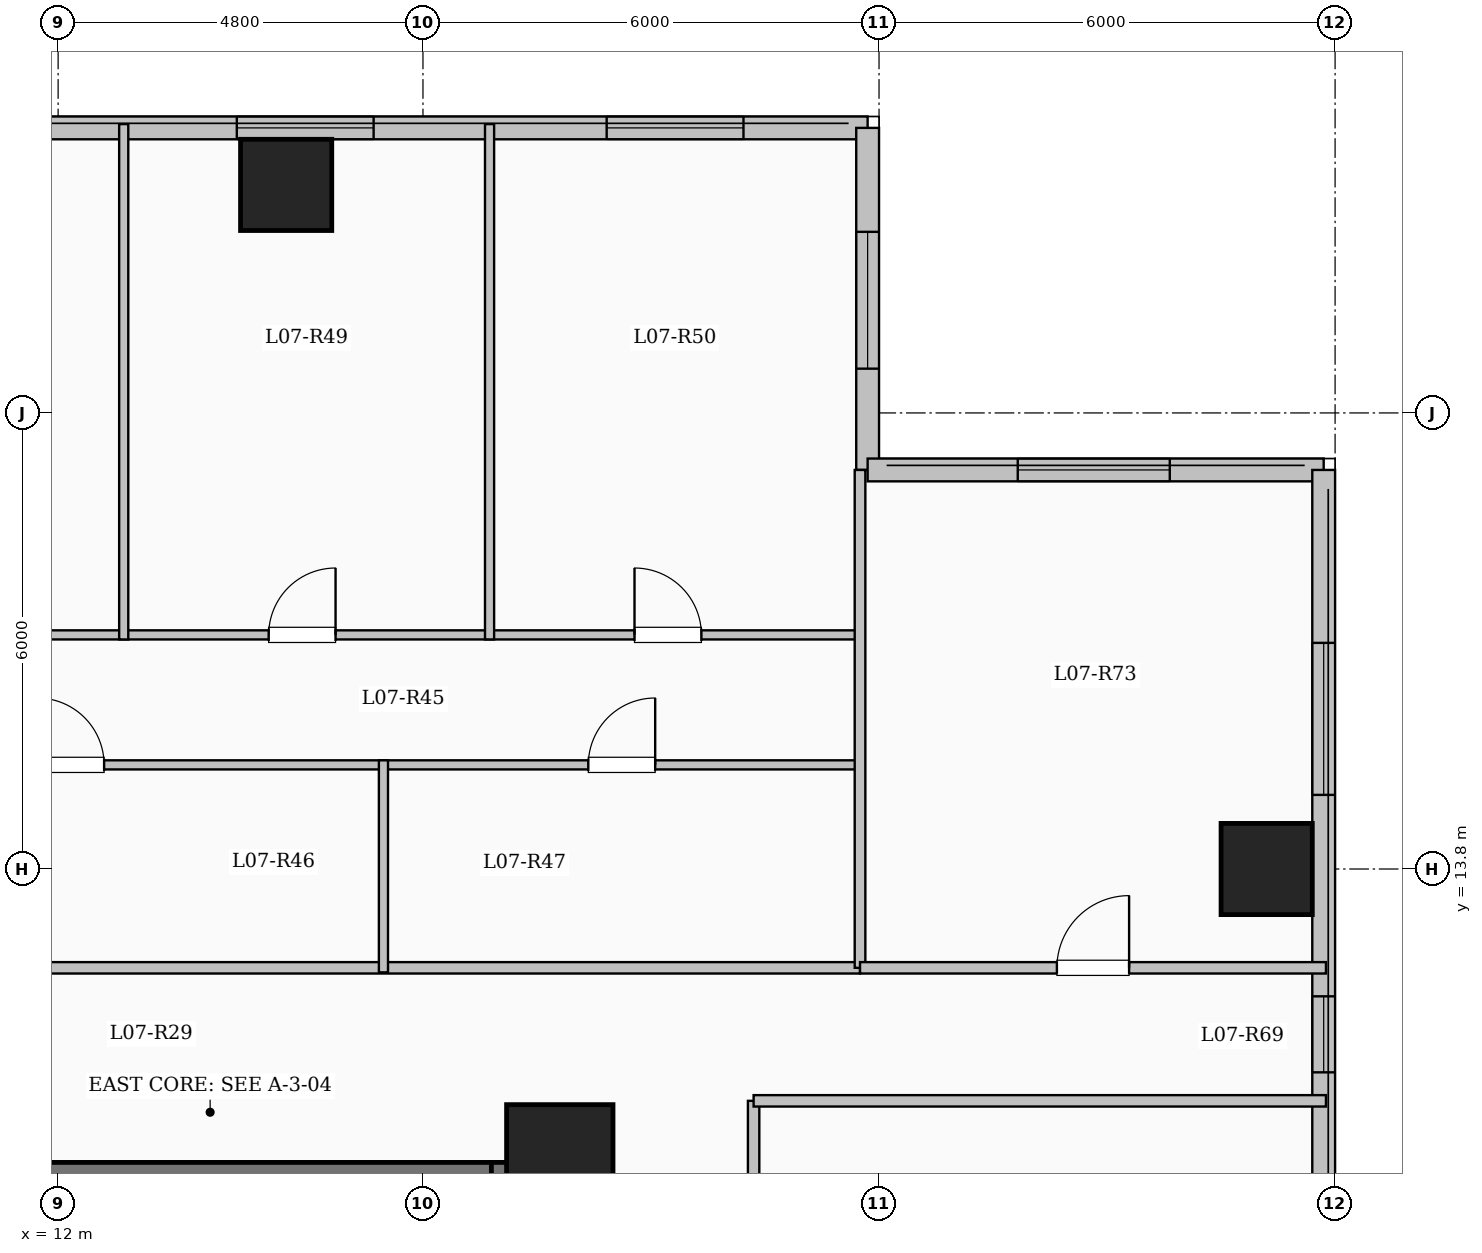
"""IFC4 building model, lengths in metres.
Left out: names, types, materials, properties, quantities, classifications, styles, units other than length and angle.
Written with IfcOpenShell. Run it as: python <this file> out.ifc"""

import sys

from ifc_helpers import new_model, si_unit, direction, frame, frame_2d, origin, origin_2d, place, context, subcontext, project, spatial, rectangle, extrude, element, fill, save


model = new_model("IFC4")
c1 = context("Model", 3, precision=1e-05, world=origin(), true_north=direction((0.0, 1.0)))
c2 = subcontext(c1, "Body", "Model", "MODEL_VIEW")
j1 = project(units=[si_unit("LENGTHUNIT", "METRE"), si_unit("PLANEANGLEUNIT", "RADIAN")], contexts=[c1])
p1 = place(None, origin())
s1 = spatial("IfcSite", under=j1, at=p1, CompositionType="ELEMENT")
p2 = place(p1, origin())
s2 = spatial("IfcBuilding", under=s1, at=p2, CompositionType="ELEMENT")
p3 = place(p2, frame((0.0, 0.0, 30.7)))
s3 = spatial("IfcBuildingStorey", under=s2, at=p3, CompositionType="ELEMENT", Elevation=30.7)
p4 = place(p3, frame((18.6, 10.0, 0.0), z_axis=(0.0, 0.0, 1.0), x_axis=(1.0, 0.0, 0.0)))
e1 = element("IfcColumn", 1, at=p4, inside=s3, PredefinedType="COLUMN", context=c2, shape_type="SweptSolid", body=[
    extrude(rectangle(XDim=1.4, YDim=1.4, at=origin_2d()), origin(), (0.0, 0.0, 1.0), 3.35),
])
for number, where, z_axis, x_axis in (
    (2, (15.0, 22.8, 0.0), (0.0, 0.0, 1.0), (1.0, 0.0, 0.0)),
    (3, (27.9, 13.8, 0.0), (0.0, 0.0, 1.0), (1.0, 0.0, 0.0)),
):
    element("IfcColumn", number, at=place(p3, frame(where, z_axis=z_axis, x_axis=x_axis)), inside=s3, PredefinedType="COLUMN", context=c2, shape_type="SweptSolid", body=[
        extrude(rectangle(XDim=1.2, YDim=1.2, at=origin_2d()), origin(), (0.0, 0.0, 1.0), 3.35),
    ])
p5 = place(p3, frame((7.35, 23.55, 0.0), z_axis=(0.0, 0.0, 1.0), x_axis=(1.0, 0.0, 0.0)))
e4 = element("IfcWall", 4, at=p5, inside=s3, PredefinedType="SOLIDWALL", context=c2, shape_type="SweptSolid", body=[
    extrude(rectangle(XDim=15.3, YDim=0.3, at=frame_2d((7.65, 0.0))), origin(), (0.0, 0.0, 1.0), 3.1),
])
p6 = place(p5, frame((2.185, 0.0, 0.9)))
e5 = element("IfcOpeningElement", 5, at=p6, cuts=e4, PredefinedType="OPENING", context=c2, shape_type="SweptSolid", body=[
    extrude(rectangle(XDim=1.8, YDim=1.65, at=frame_2d((0.9, 0.825))), frame((0.0, 0.16, 0.0), z_axis=(0.0, -1.0, 0.0), x_axis=(1.0, 0.0, 0.0)), (0.0, 0.0, 1.0), 0.32),
])
p7 = place(p5, frame((7.001, 0.0, 0.9)))
e6 = element("IfcOpeningElement", 6, at=p7, cuts=e4, PredefinedType="OPENING", context=c2, shape_type="SweptSolid", body=[
    extrude(rectangle(XDim=1.8, YDim=1.65, at=frame_2d((0.9, 0.825))), frame((0.0, 0.16, 0.0), z_axis=(0.0, -1.0, 0.0), x_axis=(1.0, 0.0, 0.0)), (0.0, 0.0, 1.0), 0.32),
])
p8 = place(p5, frame((11.867, 0.0, 0.9)))
e7 = element("IfcOpeningElement", 7, at=p8, cuts=e4, PredefinedType="OPENING", context=c2, shape_type="SweptSolid", body=[
    extrude(rectangle(XDim=1.8, YDim=1.65, at=frame_2d((0.9, 0.825))), frame((0.0, 0.16, 0.0), z_axis=(0.0, -1.0, 0.0), x_axis=(1.0, 0.0, 0.0)), (0.0, 0.0, 1.0), 0.32),
])
p9 = place(p3, frame((22.65, 23.55, 0.0), z_axis=(0.0, 0.0, 1.0), x_axis=(0.0, -1.0, 0.0)))
e8 = element("IfcWall", 8, at=p9, inside=s3, PredefinedType="SOLIDWALL", context=c2, shape_type="SweptSolid", body=[
    extrude(rectangle(XDim=4.5, YDim=0.3, at=frame_2d((2.25, 0.0))), origin(), (0.0, 0.0, 1.0), 3.1),
])
p10 = place(p9, frame((1.367, 0.0, 0.9)))
e9 = element("IfcOpeningElement", 9, at=p10, cuts=e8, PredefinedType="OPENING", context=c2, shape_type="SweptSolid", body=[
    extrude(rectangle(XDim=1.8, YDim=1.65, at=frame_2d((0.9, 0.825))), frame((0.0, 0.16, 0.0), z_axis=(0.0, -1.0, 0.0), x_axis=(1.0, 0.0, 0.0)), (0.0, 0.0, 1.0), 0.32),
])
p11 = place(p3, frame((22.65, 19.05, 0.0), z_axis=(0.0, 0.0, 1.0), x_axis=(1.0, 0.0, 0.0)))
e10 = element("IfcWall", 10, at=p11, inside=s3, PredefinedType="SOLIDWALL", context=c2, shape_type="SweptSolid", body=[
    extrude(rectangle(XDim=6.0, YDim=0.3, at=frame_2d((3.0, 0.0))), origin(), (0.0, 0.0, 1.0), 3.1),
])
p12 = place(p11, frame((1.975, 0.0, 0.9)))
e11 = element("IfcOpeningElement", 11, at=p12, cuts=e10, PredefinedType="OPENING", context=c2, shape_type="SweptSolid", body=[
    extrude(rectangle(XDim=2.0, YDim=1.7, at=frame_2d((1.0, 0.85))), frame((0.0, 0.16, 0.0), z_axis=(0.0, -1.0, 0.0), x_axis=(1.0, 0.0, 0.0)), (0.0, 0.0, 1.0), 0.32),
])
p13 = place(p3, frame((28.65, 19.05, 0.0), z_axis=(0.0, 0.0, 1.0), x_axis=(0.0, -1.0, 0.0)))
e12 = element("IfcWall", 12, at=p13, inside=s3, PredefinedType="SOLIDWALL", context=c2, shape_type="SweptSolid", body=[
    extrude(rectangle(XDim=38.1, YDim=0.3, at=frame_2d((19.05, 0.0))), origin(), (0.0, 0.0, 1.0), 3.1),
])
p14 = place(p13, frame((2.275, 0.0, 0.9)))
e13 = element("IfcOpeningElement", 13, at=p14, cuts=e12, PredefinedType="OPENING", context=c2, shape_type="SweptSolid", body=[
    extrude(rectangle(XDim=2.0, YDim=1.7, at=frame_2d((1.0, 0.85))), frame((0.0, 0.16, 0.0), z_axis=(0.0, -1.0, 0.0), x_axis=(1.0, 0.0, 0.0)), (0.0, 0.0, 1.0), 0.32),
])
p15 = place(p13, frame((6.925, 0.0, 0.95)))
e14 = element("IfcOpeningElement", 14, at=p15, cuts=e12, PredefinedType="OPENING", context=c2, shape_type="SweptSolid", body=[
    extrude(rectangle(XDim=1.0, YDim=1.5, at=frame_2d((0.5, 0.75))), frame((0.0, 0.16, 0.0), z_axis=(0.0, -1.0, 0.0), x_axis=(1.0, 0.0, 0.0)), (0.0, 0.0, 1.0), 0.32),
])
p16 = place(p13, frame((16.3, 0.0, 0.9)))
e15 = element("IfcOpeningElement", 15, at=p16, cuts=e12, PredefinedType="OPENING", context=c2, shape_type="SweptSolid", body=[
    extrude(rectangle(XDim=2.0, YDim=1.7, at=frame_2d((1.0, 0.85))), frame((0.0, 0.16, 0.0), z_axis=(0.0, -1.0, 0.0), x_axis=(1.0, 0.0, 0.0)), (0.0, 0.0, 1.0), 0.32),
])
p17 = place(p13, frame((27.058, 0.0, 0.9)))
e16 = element("IfcOpeningElement", 16, at=p17, cuts=e12, PredefinedType="OPENING", context=c2, shape_type="SweptSolid", body=[
    extrude(rectangle(XDim=1.5, YDim=1.65, at=frame_2d((0.75, 0.825))), frame((0.0, 0.16, 0.0), z_axis=(0.0, -1.0, 0.0), x_axis=(1.0, 0.0, 0.0)), (0.0, 0.0, 1.0), 0.32),
])
p18 = place(p13, frame((32.55, 0.0, 0.9)))
e17 = element("IfcOpeningElement", 17, at=p18, cuts=e12, PredefinedType="OPENING", context=c2, shape_type="SweptSolid", body=[
    extrude(rectangle(XDim=2.4, YDim=1.8, at=frame_2d((1.2, 0.9))), frame((0.0, 0.16, 0.0), z_axis=(0.0, -1.0, 0.0), x_axis=(1.0, 0.0, 0.0)), (0.0, 0.0, 1.0), 0.32),
])
p19 = place(p3, frame((10.0, 9.79, 0.0), z_axis=(0.0, 0.0, 1.0), x_axis=(1.0, 0.0, 0.0)))
e18 = element("IfcWall", 18, at=p19, inside=s3, PredefinedType="SHEAR", context=c2, shape_type="SweptSolid", body=[
    extrude(rectangle(XDim=8.0, YDim=0.3, at=frame_2d((4.0, 0.0))), origin(), (0.0, 0.0, 1.0), 3.35),
])
p20 = place(p3, frame((17.85, 6.35, 0.0), z_axis=(0.0, 0.0, 1.0), x_axis=(0.0, 1.0, 0.0)))
e19 = element("IfcWall", 19, at=p20, inside=s3, PredefinedType="SHEAR", context=c2, shape_type="SweptSolid", body=[
    extrude(rectangle(XDim=3.59, YDim=0.3, at=frame_2d((1.795, 0.0))), origin(), (0.0, 0.0, 1.0), 3.35),
])
p21 = place(p3, frame((3.85, 12.5, 0.0), z_axis=(0.0, 0.0, 1.0), x_axis=(1.0, 0.0, 0.0)))
e20 = element("IfcWall", 20, at=p21, inside=s3, PredefinedType="PARTITIONING", context=c2, shape_type="SweptSolid", body=[
    extrude(rectangle(XDim=18.7, YDim=0.15, at=frame_2d((9.35, 0.0))), origin(), (0.0, 0.0, 1.0), 3.1),
])
p22 = place(p21, frame((0.7, 0.0, 0.0)))
e21 = element("IfcOpeningElement", 21, at=p22, cuts=e20, PredefinedType="OPENING", context=c2, shape_type="SweptSolid", body=[
    extrude(rectangle(XDim=0.96, YDim=2.15, at=frame_2d((0.48, 1.075))), frame((0.0, 0.085, 0.0), z_axis=(0.0, -1.0, 0.0), x_axis=(1.0, 0.0, 0.0)), (0.0, 0.0, 1.0), 0.17),
])
p23 = place(p3, frame((21.15, -7.25, 0.0), z_axis=(0.0, 0.0, 1.0), x_axis=(0.0, 1.0, 0.0)))
e22 = element("IfcWall", 22, at=p23, inside=s3, PredefinedType="PARTITIONING", context=c2, shape_type="SweptSolid", body=[
    extrude(rectangle(XDim=18.0, YDim=0.15, at=frame_2d((9.0, 0.0))), origin(), (0.0, 0.0, 1.0), 2.585),
])
p24 = place(p3, frame((8.049, 15.17, 0.0), z_axis=(0.0, 0.0, 1.0), x_axis=(1.0, 0.0, 0.0)))
e23 = element("IfcWall", 23, at=p24, inside=s3, PredefinedType="PARTITIONING", context=c2, shape_type="SweptSolid", body=[
    extrude(rectangle(XDim=8.231, YDim=0.12, at=frame_2d((4.115, 0.0))), origin(), (0.0, 0.0, 1.0), 3.1),
])
p25 = place(p24, frame((3.676, 0.0, 0.0)))
e24 = element("IfcOpeningElement", 24, at=p25, cuts=e23, PredefinedType="OPENING", context=c2, shape_type="SweptSolid", body=[
    extrude(rectangle(XDim=0.88, YDim=2.1, at=frame_2d((0.44, 1.05))), frame((0.0, 0.07, 0.0), z_axis=(0.0, -1.0, 0.0), x_axis=(1.0, 0.0, 0.0)), (0.0, 0.0, 1.0), 0.14),
])
p26 = place(p3, frame((16.28, 15.17, 0.0), z_axis=(0.0, 0.0, 1.0), x_axis=(1.0, 0.0, 0.0)))
e25 = element("IfcWall", 25, at=p26, inside=s3, PredefinedType="PARTITIONING", context=c2, shape_type="SweptSolid", body=[
    extrude(rectangle(XDim=6.27, YDim=0.12, at=frame_2d((3.135, 0.0))), origin(), (0.0, 0.0, 1.0), 3.1),
])
p27 = place(p26, frame((2.695, 0.0, 0.0)))
e26 = element("IfcOpeningElement", 26, at=p27, cuts=e25, PredefinedType="OPENING", context=c2, shape_type="SweptSolid", body=[
    extrude(rectangle(XDim=0.88, YDim=2.1, at=frame_2d((0.44, 1.05))), frame((0.0, 0.07, 0.0), z_axis=(0.0, -1.0, 0.0), x_axis=(1.0, 0.0, 0.0)), (0.0, 0.0, 1.0), 0.14),
])
p28 = place(p3, frame((7.989, 16.88, 0.0), z_axis=(0.0, 0.0, 1.0), x_axis=(1.0, 0.0, 0.0)))
e27 = element("IfcWall", 27, at=p28, inside=s3, PredefinedType="PARTITIONING", context=c2, shape_type="SweptSolid", body=[
    extrude(rectangle(XDim=14.621, YDim=0.12, at=frame_2d((7.311, 0.0))), origin(), (0.0, 0.0, 1.0), 3.1),
])
p29 = place(p28, frame((1.967, 0.0, 0.0)))
e28 = element("IfcOpeningElement", 28, at=p29, cuts=e27, PredefinedType="OPENING", context=c2, shape_type="SweptSolid", body=[
    extrude(rectangle(XDim=0.88, YDim=2.1, at=frame_2d((0.44, 1.05))), frame((0.0, 0.07, 0.0), z_axis=(0.0, -1.0, 0.0), x_axis=(1.0, 0.0, 0.0)), (0.0, 0.0, 1.0), 0.14),
])
p30 = place(p28, frame((6.781, 0.0, 0.0)))
e29 = element("IfcOpeningElement", 29, at=p30, cuts=e27, PredefinedType="OPENING", context=c2, shape_type="SweptSolid", body=[
    extrude(rectangle(XDim=0.88, YDim=2.1, at=frame_2d((0.44, 1.05))), frame((0.0, 0.07, 0.0), z_axis=(0.0, -1.0, 0.0), x_axis=(1.0, 0.0, 0.0)), (0.0, 0.0, 1.0), 0.14),
])
p31 = place(p28, frame((11.594, 0.0, 0.0)))
e30 = element("IfcOpeningElement", 30, at=p31, cuts=e27, PredefinedType="OPENING", context=c2, shape_type="SweptSolid", body=[
    extrude(rectangle(XDim=0.88, YDim=2.1, at=frame_2d((0.44, 1.05))), frame((0.0, 0.07, 0.0), z_axis=(0.0, -1.0, 0.0), x_axis=(1.0, 0.0, 0.0)), (0.0, 0.0, 1.0), 0.14),
])
p32 = place(p3, frame((16.28, 12.44, 0.0), z_axis=(0.0, 0.0, 1.0), x_axis=(0.0, 1.0, 0.0)))
e31 = element("IfcWall", 31, at=p32, inside=s3, PredefinedType="PARTITIONING", context=c2, shape_type="SweptSolid", body=[
    extrude(rectangle(XDim=2.79, YDim=0.12, at=frame_2d((1.395, 0.0))), origin(), (0.0, 0.0, 1.0), 3.1),
])
for number, where, z_axis, x_axis in (
    (32, (12.863, 16.82, 0.0), (0.0, 0.0, 1.0), (0.0, 1.0, 0.0)),
    (33, (17.676, 16.82, 0.0), (0.0, 0.0, 1.0), (0.0, 1.0, 0.0)),
):
    element("IfcWall", number, at=place(p3, frame(where, z_axis=z_axis, x_axis=x_axis)), inside=s3, PredefinedType="PARTITIONING", context=c2, shape_type="SweptSolid", body=[
        extrude(rectangle(XDim=6.78, YDim=0.12, at=frame_2d((3.39, 0.0))), origin(), (0.0, 0.0, 1.0), 3.1),
    ])
p33 = place(p3, frame((21.15, 10.75, 0.0), z_axis=(0.0, 0.0, 1.0), x_axis=(1.0, 0.0, 0.0)))
e34 = element("IfcWall", 34, at=p33, inside=s3, PredefinedType="PARTITIONING", context=c2, shape_type="SweptSolid", body=[
    extrude(rectangle(XDim=7.53, YDim=0.15, at=frame_2d((3.765, 0.0))), origin(), (0.0, 0.0, 1.0), 3.1),
])
p34 = place(p3, frame((22.55, 12.5, 0.0), z_axis=(0.0, 0.0, 1.0), x_axis=(0.0, 1.0, 0.0)))
e35 = element("IfcWall", 35, at=p34, inside=s3, PredefinedType="PARTITIONING", context=c2, shape_type="SweptSolid", body=[
    extrude(rectangle(XDim=6.55, YDim=0.14, at=frame_2d((3.275, 0.0))), origin(), (0.0, 0.0, 1.0), 3.1),
])
p35 = place(p3, frame((22.55, 12.5, 0.0), z_axis=(0.0, 0.0, 1.0), x_axis=(1.0, 0.0, 0.0)))
e36 = element("IfcWall", 36, at=p35, inside=s3, PredefinedType="PARTITIONING", context=c2, shape_type="SweptSolid", body=[
    extrude(rectangle(XDim=6.13, YDim=0.15, at=frame_2d((3.065, 0.0))), origin(), (0.0, 0.0, 1.0), 3.1),
])
p36 = place(p35, frame((2.59, 0.0, 0.0)))
e37 = element("IfcOpeningElement", 37, at=p36, cuts=e36, PredefinedType="OPENING", context=c2, shape_type="SweptSolid", body=[
    extrude(rectangle(XDim=0.95, YDim=2.15, at=frame_2d((0.475, 1.075))), frame((0.0, 0.085, 0.0), z_axis=(0.0, -1.0, 0.0), x_axis=(1.0, 0.0, 0.0)), (0.0, 0.0, 1.0), 0.17),
])
p37 = place(p7, origin())
e38 = element("IfcWindow", 38, at=p37, inside=s3, PartitioningType="SINGLE_PANEL", PredefinedType="WINDOW", context=c2, shape_type="SweptSolid", body=[
    extrude(rectangle(XDim=1.8, YDim=1.65, at=frame_2d((0.9, 0.825))), frame((0.0, 0.03, 0.0), z_axis=(0.0, -1.0, 0.0), x_axis=(1.0, 0.0, 0.0)), (0.0, 0.0, 1.0), 0.06),
])
fill(e6, e38)
p38 = place(p8, origin())
e39 = element("IfcWindow", 39, at=p38, inside=s3, PartitioningType="SINGLE_PANEL", PredefinedType="WINDOW", context=c2, shape_type="SweptSolid", body=[
    extrude(rectangle(XDim=1.8, YDim=1.65, at=frame_2d((0.9, 0.825))), frame((0.0, 0.03, 0.0), z_axis=(0.0, -1.0, 0.0), x_axis=(1.0, 0.0, 0.0)), (0.0, 0.0, 1.0), 0.06),
])
fill(e7, e39)
p39 = place(p10, origin())
e40 = element("IfcWindow", 40, at=p39, inside=s3, PartitioningType="SINGLE_PANEL", PredefinedType="WINDOW", context=c2, shape_type="SweptSolid", body=[
    extrude(rectangle(XDim=1.8, YDim=1.65, at=frame_2d((0.9, 0.825))), frame((0.0, 0.03, 0.0), z_axis=(0.0, -1.0, 0.0), x_axis=(1.0, 0.0, 0.0)), (0.0, 0.0, 1.0), 0.06),
])
fill(e9, e40)
p40 = place(p12, origin())
e41 = element("IfcWindow", 41, at=p40, inside=s3, PartitioningType="SINGLE_PANEL", PredefinedType="WINDOW", context=c2, shape_type="SweptSolid", body=[
    extrude(rectangle(XDim=2.0, YDim=1.7, at=frame_2d((1.0, 0.85))), frame((0.0, 0.03, 0.0), z_axis=(0.0, -1.0, 0.0), x_axis=(1.0, 0.0, 0.0)), (0.0, 0.0, 1.0), 0.06),
])
fill(e11, e41)
p41 = place(p14, origin())
e42 = element("IfcWindow", 42, at=p41, inside=s3, PartitioningType="SINGLE_PANEL", PredefinedType="WINDOW", context=c2, shape_type="SweptSolid", body=[
    extrude(rectangle(XDim=2.0, YDim=1.7, at=frame_2d((1.0, 0.85))), frame((0.0, 0.03, 0.0), z_axis=(0.0, -1.0, 0.0), x_axis=(1.0, 0.0, 0.0)), (0.0, 0.0, 1.0), 0.06),
])
fill(e13, e42)
p42 = place(p15, origin())
e43 = element("IfcWindow", 43, at=p42, inside=s3, PartitioningType="SINGLE_PANEL", PredefinedType="WINDOW", context=c2, shape_type="SweptSolid", body=[
    extrude(rectangle(XDim=1.0, YDim=1.5, at=frame_2d((0.5, 0.75))), frame((0.0, 0.03, 0.0), z_axis=(0.0, -1.0, 0.0), x_axis=(1.0, 0.0, 0.0)), (0.0, 0.0, 1.0), 0.06),
])
fill(e14, e43)
p43 = place(p25, origin())
e44 = element("IfcDoor", 44, at=p43, inside=s3, OperationType="SINGLE_SWING_LEFT", PredefinedType="DOOR", context=c2, shape_type="SweptSolid", body=[
    extrude(rectangle(XDim=0.88, YDim=2.1, at=frame_2d((0.44, 1.05))), frame((0.0, 0.025, 0.0), z_axis=(0.0, -1.0, 0.0), x_axis=(1.0, 0.0, 0.0)), (0.0, 0.0, 1.0), 0.05),
])
fill(e24, e44)
p44 = place(p27, origin())
e45 = element("IfcDoor", 45, at=p44, inside=s3, OperationType="SINGLE_SWING_RIGHT", PredefinedType="DOOR", context=c2, shape_type="SweptSolid", body=[
    extrude(rectangle(XDim=0.88, YDim=2.1, at=frame_2d((0.44, 1.05))), frame((0.0, 0.025, 0.0), z_axis=(0.0, -1.0, 0.0), x_axis=(1.0, 0.0, 0.0)), (0.0, 0.0, 1.0), 0.05),
])
fill(e26, e45)
p45 = place(p30, origin())
e46 = element("IfcDoor", 46, at=p45, inside=s3, OperationType="SINGLE_SWING_RIGHT", PredefinedType="DOOR", context=c2, shape_type="SweptSolid", body=[
    extrude(rectangle(XDim=0.88, YDim=2.1, at=frame_2d((0.44, 1.05))), frame((0.0, 0.025, 0.0), z_axis=(0.0, -1.0, 0.0), x_axis=(1.0, 0.0, 0.0)), (0.0, 0.0, 1.0), 0.05),
])
fill(e29, e46)
p46 = place(p31, origin())
e47 = element("IfcDoor", 47, at=p46, inside=s3, OperationType="SINGLE_SWING_LEFT", PredefinedType="DOOR", context=c2, shape_type="SweptSolid", body=[
    extrude(rectangle(XDim=0.88, YDim=2.1, at=frame_2d((0.44, 1.05))), frame((0.0, 0.025, 0.0), z_axis=(0.0, -1.0, 0.0), x_axis=(1.0, 0.0, 0.0)), (0.0, 0.0, 1.0), 0.05),
])
fill(e30, e47)
p47 = place(p36, origin())
e48 = element("IfcDoor", 48, at=p47, inside=s3, OperationType="SINGLE_SWING_RIGHT", PredefinedType="DOOR", context=c2, shape_type="SweptSolid", body=[
    extrude(rectangle(XDim=0.95, YDim=2.15, at=frame_2d((0.475, 1.075))), frame((0.0, 0.025, 0.0), z_axis=(0.0, -1.0, 0.0), x_axis=(1.0, 0.0, 0.0)), (0.0, 0.0, 1.0), 0.05),
])
fill(e37, e48)
save(model, sys.argv[1])
